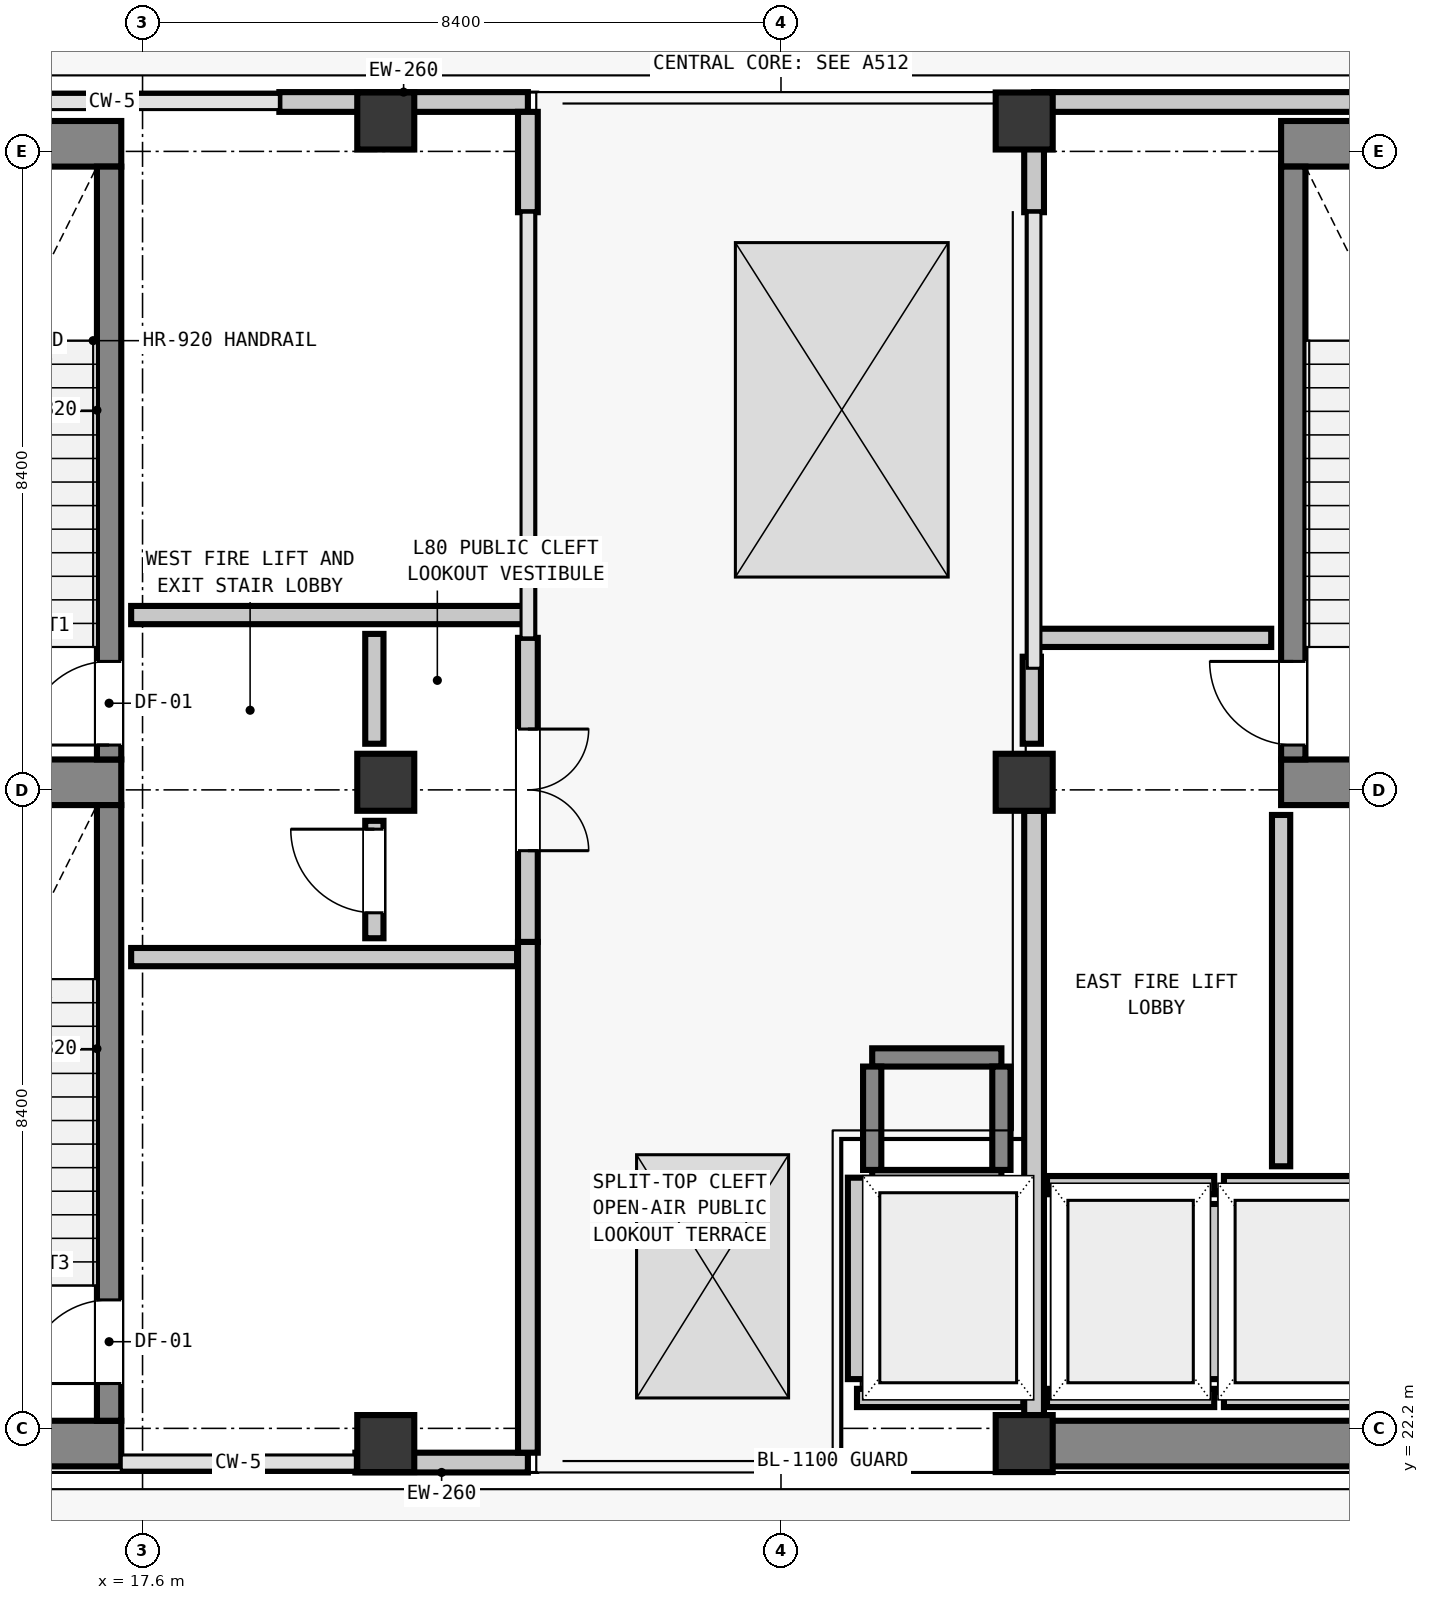
"""IFC4 building model, lengths in metres.
Left out: names, types, materials, properties, quantities, classifications, styles, units other than length and angle.
Written with IfcOpenShell. Run it as: python <this file> out.ifc"""

import sys

from ifc_helpers import new_model, si_unit, direction, frame, frame_2d, origin, origin_2d, place, context, subcontext, project, spatial, rectangle, extrude, element, fill, save


model = new_model("IFC4")
c1 = context("Model", 3, precision=1e-05, world=origin(), true_north=direction((0.0, 1.0)))
c2 = subcontext(c1, "Body", "Model", "MODEL_VIEW")
j1 = project(units=[si_unit("LENGTHUNIT", "METRE"), si_unit("PLANEANGLEUNIT", "RADIAN")], contexts=[c1])
p1 = place(None, origin())
s1 = spatial("IfcSite", under=j1, at=p1, CompositionType="ELEMENT")
p2 = place(p1, origin())
s2 = spatial("IfcBuilding", under=s1, at=p2, CompositionType="ELEMENT")
p3 = place(p2, frame((0.0, 0.0, 278.08)))
s3 = spatial("IfcBuildingStorey", under=s2, at=p3, CompositionType="ELEMENT", Elevation=278.08)
for number, where, z_axis, x_axis in (
    (1, (13.24, 22.0, 0.0), (0.0, 0.0, 1.0), (1.0, 0.0, 0.0)),
    (2, (13.24, 39.1, 0.0), (0.0, 0.0, 1.0), (1.0, 0.0, 0.0)),
    (3, (13.24, 30.7, 0.0), (0.0, 0.0, 1.0), (1.0, 0.0, 0.0)),
):
    element("IfcWall", number, at=place(p3, frame(where, z_axis=z_axis, x_axis=x_axis)), inside=s3, PredefinedType="SHEAR", context=c2, shape_type="SweptSolid", body=[
        extrude(rectangle(XDim=4.08, YDim=0.6, at=frame_2d((2.04, 0.0))), origin(), (0.0, 0.0, 1.0), 4.9),
    ])
p4 = place(p3, frame((29.2, 22.0, 0.0), z_axis=(0.0, 0.0, 1.0), x_axis=(1.0, 0.0, 0.0)))
e4 = element("IfcWall", 4, at=p4, inside=s3, PredefinedType="SHEAR", context=c2, shape_type="SweptSolid", body=[
    extrude(rectangle(XDim=7.46, YDim=0.6, at=frame_2d((3.73, 0.0))), origin(), (0.0, 0.0, 1.0), 4.9),
])
for number, where, z_axis, x_axis in (
    (5, (32.58, 39.1, 0.0), (0.0, 0.0, 1.0), (1.0, 0.0, 0.0)),
    (6, (32.58, 30.7, 0.0), (0.0, 0.0, 1.0), (1.0, 0.0, 0.0)),
):
    element("IfcWall", number, at=place(p3, frame(where, z_axis=z_axis, x_axis=x_axis)), inside=s3, PredefinedType="SHEAR", context=c2, shape_type="SweptSolid", body=[
        extrude(rectangle(XDim=4.08, YDim=0.6, at=frame_2d((2.04, 0.0))), origin(), (0.0, 0.0, 1.0), 4.9),
    ])
p5 = place(p3, frame((17.16, 31.0, 0.0), z_axis=(0.0, 0.0, 1.0), x_axis=(0.0, 1.0, 0.0)))
e7 = element("IfcWall", 7, at=p5, inside=s3, PredefinedType="SHEAR", context=c2, shape_type="SweptSolid", body=[
    extrude(rectangle(XDim=7.8, YDim=0.32, at=frame_2d((3.9, 0.0))), origin(), (0.0, 0.0, 1.0), 4.9),
])
p6 = place(p5, frame((0.19, 0.0, 0.0)))
e8 = element("IfcOpeningElement", 8, at=p6, cuts=e7, PredefinedType="OPENING", context=c2, shape_type="SweptSolid", body=[
    extrude(rectangle(XDim=1.1, YDim=2.15, at=frame_2d((0.55, 1.075))), frame((0.0, 0.17, 0.0), z_axis=(0.0, -1.0, 0.0), x_axis=(1.0, 0.0, 0.0)), (0.0, 0.0, 1.0), 0.34),
])
p7 = place(p3, frame((17.16, 22.3, 0.0), z_axis=(0.0, 0.0, 1.0), x_axis=(0.0, 1.0, 0.0)))
e9 = element("IfcWall", 9, at=p7, inside=s3, PredefinedType="SHEAR", context=c2, shape_type="SweptSolid", body=[
    extrude(rectangle(XDim=8.1, YDim=0.32, at=frame_2d((4.05, 0.0))), origin(), (0.0, 0.0, 1.0), 4.9),
])
p8 = place(p7, frame((0.49, 0.0, 0.0)))
e10 = element("IfcOpeningElement", 10, at=p8, cuts=e9, PredefinedType="OPENING", context=c2, shape_type="SweptSolid", body=[
    extrude(rectangle(XDim=1.1, YDim=2.15, at=frame_2d((0.55, 1.075))), frame((0.0, 0.17, 0.0), z_axis=(0.0, -1.0, 0.0), x_axis=(1.0, 0.0, 0.0)), (0.0, 0.0, 1.0), 0.34),
])
p9 = place(p3, frame((32.74, 31.0, 0.0), z_axis=(0.0, 0.0, 1.0), x_axis=(0.0, 1.0, 0.0)))
e11 = element("IfcWall", 11, at=p9, inside=s3, PredefinedType="SHEAR", context=c2, shape_type="SweptSolid", body=[
    extrude(rectangle(XDim=7.8, YDim=0.32, at=frame_2d((3.9, 0.0))), origin(), (0.0, 0.0, 1.0), 4.9),
])
p10 = place(p9, frame((0.19, 0.0, 0.0)))
e12 = element("IfcOpeningElement", 12, at=p10, cuts=e11, PredefinedType="OPENING", context=c2, shape_type="SweptSolid", body=[
    extrude(rectangle(XDim=1.1, YDim=2.15, at=frame_2d((0.55, 1.075))), frame((0.0, 0.17, 0.0), z_axis=(0.0, -1.0, 0.0), x_axis=(1.0, 0.0, 0.0)), (0.0, 0.0, 1.0), 0.34),
])
for number, where, z_axis, x_axis in (
    (13, (27.2, 25.48, 0.0), (0.0, 0.0, 1.0), (1.0, 0.0, 0.0)),
    (14, (27.2, 27.08, 0.0), (0.0, 0.0, 1.0), (1.0, 0.0, 0.0)),
):
    element("IfcWall", number, at=place(p3, frame(where, z_axis=z_axis, x_axis=x_axis)), inside=s3, PredefinedType="SHEAR", context=c2, shape_type="SweptSolid", body=[
        extrude(rectangle(XDim=1.7, YDim=0.24, at=frame_2d((0.85, 0.0))), origin(), (0.0, 0.0, 1.0), 4.9),
    ])
for number, where, z_axis, x_axis in (
    (15, (27.2, 25.6, 0.0), (0.0, 0.0, 1.0), (0.0, 1.0, 0.0)),
    (16, (28.9, 25.6, 0.0), (0.0, 0.0, 1.0), (0.0, 1.0, 0.0)),
):
    element("IfcWall", number, at=place(p3, frame(where, z_axis=z_axis, x_axis=x_axis)), inside=s3, PredefinedType="SHEAR", context=c2, shape_type="SweptSolid", body=[
        extrude(rectangle(XDim=1.36, YDim=0.24, at=frame_2d((0.68, 0.0))), origin(), (0.0, 0.0, 1.0), 4.9),
    ])
for number, where, z_axis, x_axis in (
    (17, (20.8, 30.7, 0.0), (0.0, 0.0, 1.0), (1.0, 0.0, 0.0)),
    (18, (29.2, 30.7, 0.0), (0.0, 0.0, 1.0), (1.0, 0.0, 0.0)),
):
    element("IfcColumn", number, at=place(p3, frame(where, z_axis=z_axis, x_axis=x_axis)), inside=s3, PredefinedType="COLUMN", context=c2, shape_type="SweptSolid", body=[
        extrude(rectangle(XDim=0.75, YDim=0.75, at=origin_2d()), origin(), (0.0, 0.0, 1.0), 4.9),
    ])
for number, where, z_axis, x_axis in (
    (19, (20.8, 22.0, -0.42), (0.0, 0.0, 1.0), (1.0, 0.0, 0.0)),
    (20, (20.8, 39.4, -0.42), (0.0, 0.0, 1.0), (1.0, 0.0, 0.0)),
    (21, (29.2, 22.0, -0.42), (0.0, 0.0, 1.0), (1.0, 0.0, 0.0)),
    (22, (29.2, 39.4, -0.42), (0.0, 0.0, 1.0), (1.0, 0.0, 0.0)),
):
    element("IfcColumn", number, at=place(p3, frame(where, z_axis=z_axis, x_axis=x_axis)), inside=s3, PredefinedType="COLUMN", context=c2, shape_type="SweptSolid", body=[
        extrude(rectangle(XDim=0.75, YDim=0.75, at=origin_2d()), origin(), (0.0, 0.0, 1.0), 5.32),
    ])
p11 = place(p3, frame((22.67, 21.75, 0.0), z_axis=(0.0, 0.0, 1.0), x_axis=(-1.0, 0.0, 0.0)))
e23 = element("IfcWall", 23, at=p11, inside=s3, PredefinedType="STANDARD", context=c2, shape_type="SweptSolid", body=[
    extrude(rectangle(XDim=2.27, YDim=0.26, at=frame_2d((1.135, 0.0))), origin(), (0.0, 0.0, 1.0), 3.754),
])
p12 = place(p3, frame((19.4, 39.65, 0.0), z_axis=(0.0, 0.0, 1.0), x_axis=(1.0, 0.0, 0.0)))
e24 = element("IfcWall", 24, at=p12, inside=s3, PredefinedType="STANDARD", context=c2, shape_type="SweptSolid", body=[
    extrude(rectangle(XDim=3.27, YDim=0.26, at=frame_2d((1.635, 0.0))), origin(), (0.0, 0.0, 1.0), 3.754),
])
p13 = place(p3, frame((22.67, 21.88, 0.0), z_axis=(0.0, 0.0, 1.0), x_axis=(0.0, 1.0, 0.0)))
e25 = element("IfcWall", 25, at=p13, inside=s3, PredefinedType="STANDARD", context=c2, shape_type="SweptSolid", body=[
    extrude(rectangle(XDim=6.72, YDim=0.26, at=frame_2d((3.36, 0.0))), origin(), (0.0, 0.0, 1.0), 4.62),
])
p14 = place(p3, frame((22.67, 32.6, 0.0), z_axis=(0.0, 0.0, 1.0), x_axis=(0.0, -1.0, 0.0)))
e26 = element("IfcWall", 26, at=p14, inside=s3, PredefinedType="STANDARD", context=c2, shape_type="SweptSolid", body=[
    extrude(rectangle(XDim=4.0, YDim=0.26, at=frame_2d((2.0, 0.0))), origin(), (0.0, 0.0, 1.0), 4.62),
])
p15 = place(p14, frame((1.2, 0.0, 0.0)))
e27 = element("IfcOpeningElement", 27, at=p15, cuts=e26, PredefinedType="OPENING", context=c2, shape_type="SweptSolid", body=[
    extrude(rectangle(XDim=1.6, YDim=2.2, at=frame_2d((0.8, 1.1))), frame((0.0, 0.14, 0.0), z_axis=(0.0, -1.0, 0.0), x_axis=(1.0, 0.0, 0.0)), (0.0, 0.0, 1.0), 0.28),
])
p16 = place(p3, frame((22.67, 38.2, 0.0), z_axis=(0.0, 0.0, 1.0), x_axis=(0.0, 1.0, 0.0)))
e28 = element("IfcWall", 28, at=p16, inside=s3, PredefinedType="STANDARD", context=c2, shape_type="SweptSolid", body=[
    extrude(rectangle(XDim=1.32, YDim=0.26, at=frame_2d((0.66, 0.0))), origin(), (0.0, 0.0, 1.0), 4.62),
])
p17 = place(p3, frame((29.33, 39.65, 0.0), z_axis=(0.0, 0.0, 1.0), x_axis=(1.0, 0.0, 0.0)))
e29 = element("IfcWall", 29, at=p17, inside=s3, PredefinedType="STANDARD", context=c2, shape_type="SweptSolid", body=[
    extrude(rectangle(XDim=10.42, YDim=0.26, at=frame_2d((5.21, 0.0))), origin(), (0.0, 0.0, 1.0), 3.754),
])
p18 = place(p3, frame((29.33, 22.3, 0.0), z_axis=(0.0, 0.0, 1.0), x_axis=(0.0, 1.0, 0.0)))
e30 = element("IfcWall", 30, at=p18, inside=s3, PredefinedType="STANDARD", context=c2, shape_type="SweptSolid", body=[
    extrude(rectangle(XDim=8.025, YDim=0.26, at=frame_2d((4.012, 0.0))), origin(), (0.0, 0.0, 1.0), 3.754),
])
p19 = place(p3, frame((29.33, 38.2, 0.0), z_axis=(0.0, 0.0, 1.0), x_axis=(0.0, 1.0, 0.0)))
e31 = element("IfcWall", 31, at=p19, inside=s3, PredefinedType="STANDARD", context=c2, shape_type="SweptSolid", body=[
    extrude(rectangle(XDim=1.32, YDim=0.26, at=frame_2d((0.66, 0.0))), origin(), (0.0, 0.0, 1.0), 3.912),
])
for number, where, z_axis, x_axis in (
    (32, (29.5, 22.6, 0.0), (0.0, 0.0, 1.0), (1.0, 0.0, 0.0)),
    (33, (29.5, 25.4, 0.0), (0.0, 0.0, 1.0), (1.0, 0.0, 0.0)),
):
    element("IfcWall", number, at=place(p3, frame(where, z_axis=z_axis, x_axis=x_axis)), inside=s3, PredefinedType="PARTITIONING", context=c2, shape_type="SweptSolid", body=[
        extrude(rectangle(XDim=2.2, YDim=0.24, at=frame_2d((1.1, 0.0))), origin(), (0.0, 0.0, 1.0), 4.62),
    ])
p20 = place(p3, frame((31.7, 22.848, 0.0), z_axis=(0.0, 0.0, 1.0), x_axis=(0.0, 1.0, 0.0)))
e34 = element("IfcWall", 34, at=p20, inside=s3, PredefinedType="PARTITIONING", context=c2, shape_type="SweptSolid", body=[
    extrude(rectangle(XDim=2.304, YDim=0.24, at=frame_2d((1.152, 0.0))), origin(), (0.0, 0.0, 1.0), 4.62),
])
for number, where, z_axis, x_axis in (
    (35, (31.828, 22.6, 0.0), (0.0, 0.0, 1.0), (1.0, 0.0, 0.0)),
    (36, (31.828, 25.4, 0.0), (0.0, 0.0, 1.0), (1.0, 0.0, 0.0)),
):
    element("IfcWall", number, at=place(p3, frame(where, z_axis=z_axis, x_axis=x_axis)), inside=s3, PredefinedType="PARTITIONING", context=c2, shape_type="SweptSolid", body=[
        extrude(rectangle(XDim=2.072, YDim=0.24, at=frame_2d((1.036, 0.0))), origin(), (0.0, 0.0, 1.0), 4.62),
    ])
p21 = place(p3, frame((27.0, 22.6, 0.0), z_axis=(0.0, 0.0, 1.0), x_axis=(1.0, 0.0, 0.0)))
e37 = element("IfcWall", 37, at=p21, inside=s3, PredefinedType="PARTITIONING", context=c2, shape_type="SweptSolid", body=[
    extrude(rectangle(XDim=2.188, YDim=0.24, at=frame_2d((1.094, 0.0))), origin(), (0.0, 0.0, 1.0), 4.62),
])
p22 = place(p3, frame((27.0, 22.848, 0.0), z_axis=(0.0, 0.0, 1.0), x_axis=(0.0, 1.0, 0.0)))
e38 = element("IfcWall", 38, at=p22, inside=s3, PredefinedType="PARTITIONING", context=c2, shape_type="SweptSolid", body=[
    extrude(rectangle(XDim=2.65, YDim=0.24, at=frame_2d((1.325, 0.0))), origin(), (0.0, 0.0, 1.0), 3.912),
])
p23 = place(p3, frame((17.45, 28.4, 0.0), z_axis=(0.0, 0.0, 1.0), x_axis=(1.0, 0.0, 0.0)))
e39 = element("IfcWall", 39, at=p23, inside=s3, PredefinedType="PARTITIONING", context=c2, shape_type="SweptSolid", body=[
    extrude(rectangle(XDim=5.078, YDim=0.24, at=frame_2d((2.539, 0.0))), origin(), (0.0, 0.0, 1.0), 4.62),
])
p24 = place(p3, frame((29.3, 32.6, 0.0), z_axis=(0.0, 0.0, 1.0), x_axis=(1.0, 0.0, 0.0)))
e40 = element("IfcWall", 40, at=p24, inside=s3, PredefinedType="PARTITIONING", context=c2, shape_type="SweptSolid", body=[
    extrude(rectangle(XDim=3.15, YDim=0.24, at=frame_2d((1.575, 0.0))), origin(), (0.0, 0.0, 1.0), 4.62),
])
p25 = place(p3, frame((17.45, 32.9, 0.0), z_axis=(0.0, 0.0, 1.0), x_axis=(1.0, 0.0, 0.0)))
e41 = element("IfcWall", 41, at=p25, inside=s3, PredefinedType="PARTITIONING", context=c2, shape_type="SweptSolid", body=[
    extrude(rectangle(XDim=5.22, YDim=0.24, at=frame_2d((2.61, 0.0))), origin(), (0.0, 0.0, 1.0), 4.62),
])
p26 = place(p3, frame((20.65, 28.648, 0.0), z_axis=(0.0, 0.0, 1.0), x_axis=(0.0, 1.0, 0.0)))
e42 = element("IfcWall", 42, at=p26, inside=s3, PredefinedType="PARTITIONING", context=c2, shape_type="SweptSolid", body=[
    extrude(rectangle(XDim=1.545, YDim=0.24, at=frame_2d((0.772, 0.0))), origin(), (0.0, 0.0, 1.0), 3.912),
])
p27 = place(p26, frame((0.335, 0.0, 0.0)))
e43 = element("IfcOpeningElement", 43, at=p27, cuts=e42, PredefinedType="OPENING", context=c2, shape_type="SweptSolid", body=[
    extrude(rectangle(XDim=1.1, YDim=2.15, at=frame_2d((0.55, 1.075))), frame((0.0, 0.13, 0.0), z_axis=(0.0, -1.0, 0.0), x_axis=(1.0, 0.0, 0.0)), (0.0, 0.0, 1.0), 0.26),
])
p28 = place(p3, frame((20.65, 31.207, 0.0), z_axis=(0.0, 0.0, 1.0), x_axis=(0.0, 1.0, 0.0)))
e44 = element("IfcWall", 44, at=p28, inside=s3, PredefinedType="PARTITIONING", context=c2, shape_type="SweptSolid", body=[
    extrude(rectangle(XDim=1.445, YDim=0.24, at=frame_2d((0.723, 0.0))), origin(), (0.0, 0.0, 1.0), 3.912),
])
p29 = place(p3, frame((29.3, 31.207, 0.0), z_axis=(0.0, 0.0, 1.0), x_axis=(0.0, 1.0, 0.0)))
e45 = element("IfcWall", 45, at=p29, inside=s3, PredefinedType="PARTITIONING", context=c2, shape_type="SweptSolid", body=[
    extrude(rectangle(XDim=1.145, YDim=0.24, at=frame_2d((0.573, 0.0))), origin(), (0.0, 0.0, 1.0), 3.912),
])
p30 = place(p3, frame((32.58, 25.648, 0.0), z_axis=(0.0, 0.0, 1.0), x_axis=(0.0, 1.0, 0.0)))
e46 = element("IfcWall", 46, at=p30, inside=s3, PredefinedType="PARTITIONING", context=c2, shape_type="SweptSolid", body=[
    extrude(rectangle(XDim=4.622, YDim=0.24, at=frame_2d((2.311, 0.0))), origin(), (0.0, 0.0, 1.0), 4.62),
])
p31 = place(p15, origin())
e47 = element("IfcDoor", 47, at=p31, inside=s3, OperationType="DOUBLE_DOOR_SINGLE_SWING", PredefinedType="DOOR", context=c2, shape_type="SweptSolid", body=[
    extrude(rectangle(XDim=1.6, YDim=2.2, at=frame_2d((0.8, 1.1))), frame((0.0, 0.025, 0.0), z_axis=(0.0, -1.0, 0.0), x_axis=(1.0, 0.0, 0.0)), (0.0, 0.0, 1.0), 0.05),
])
fill(e27, e47)
p32 = place(p6, origin())
e48 = element("IfcDoor", 48, at=p32, inside=s3, OperationType="SINGLE_SWING_LEFT", PredefinedType="DOOR", context=c2, shape_type="SweptSolid", body=[
    extrude(rectangle(XDim=1.1, YDim=2.15, at=frame_2d((0.55, 1.075))), frame((0.0, 0.025, 0.0), z_axis=(0.0, -1.0, 0.0), x_axis=(1.0, 0.0, 0.0)), (0.0, 0.0, 1.0), 0.05),
])
fill(e8, e48)
p33 = place(p10, origin())
e49 = element("IfcDoor", 49, at=p33, inside=s3, OperationType="SINGLE_SWING_RIGHT", PredefinedType="DOOR", context=c2, shape_type="SweptSolid", body=[
    extrude(rectangle(XDim=1.1, YDim=2.15, at=frame_2d((0.55, 1.075))), frame((0.0, 0.025, 0.0), z_axis=(0.0, -1.0, 0.0), x_axis=(1.0, 0.0, 0.0)), (0.0, 0.0, 1.0), 0.05),
])
fill(e12, e49)
p34 = place(p8, origin())
e50 = element("IfcDoor", 50, at=p34, inside=s3, OperationType="SINGLE_SWING_LEFT", PredefinedType="DOOR", context=c2, shape_type="SweptSolid", body=[
    extrude(rectangle(XDim=1.1, YDim=2.15, at=frame_2d((0.55, 1.075))), frame((0.0, 0.025, 0.0), z_axis=(0.0, -1.0, 0.0), x_axis=(1.0, 0.0, 0.0)), (0.0, 0.0, 1.0), 0.05),
])
fill(e10, e50)
p35 = place(p27, origin())
e51 = element("IfcDoor", 51, at=p35, inside=s3, OperationType="SINGLE_SWING_RIGHT", PredefinedType="DOOR", context=c2, shape_type="SweptSolid", body=[
    extrude(rectangle(XDim=1.1, YDim=2.15, at=frame_2d((0.55, 1.075))), frame((0.0, 0.025, 0.0), z_axis=(0.0, -1.0, 0.0), x_axis=(1.0, 0.0, 0.0)), (0.0, 0.0, 1.0), 0.05),
])
fill(e43, e51)
save(model, sys.argv[1])
